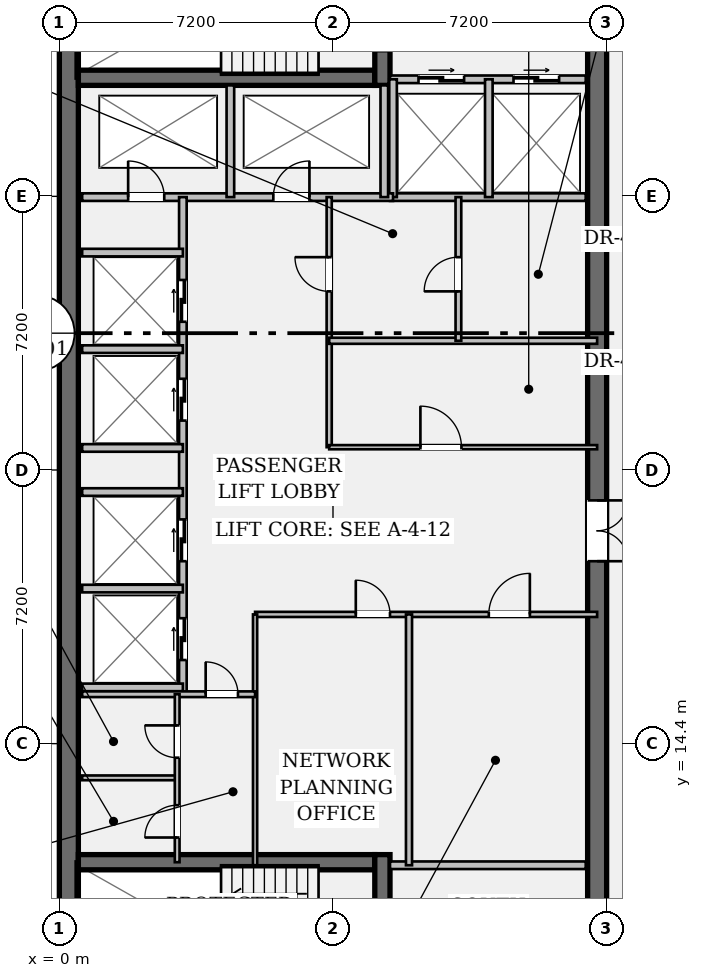
"""IFC4 building model, lengths in metres.
Left out: names, types, materials, properties, quantities, classifications, styles, units other than length and angle.
Written with IfcOpenShell. Run it as: python <this file> out.ifc"""

import sys

from ifc_helpers import new_model, si_unit, direction, frame, frame_2d, origin, place, context, subcontext, project, spatial, rectangle, extrude, element, fill, save


model = new_model("IFC4")
c1 = context("Model", 3, precision=1e-05, world=origin(), true_north=direction((0.0, 1.0)))
c2 = subcontext(c1, "Body", "Model", "MODEL_VIEW")
j1 = project(units=[si_unit("LENGTHUNIT", "METRE"), si_unit("PLANEANGLEUNIT", "RADIAN")], contexts=[c1])
p1 = place(None, origin())
s1 = spatial("IfcSite", under=j1, at=p1, CompositionType="ELEMENT")
p2 = place(p1, origin())
s2 = spatial("IfcBuilding", under=s1, at=p2, CompositionType="ELEMENT")
p3 = place(p2, frame((0.0, 0.0, 208.25)))
s3 = spatial("IfcBuildingStorey", under=s2, at=p3, CompositionType="ELEMENT", Elevation=208.25)
p4 = place(p3, frame((0.25, 7.2, 0.0), z_axis=(0.0, 0.0, 1.0), x_axis=(0.0, 1.0, 0.0)))
e1 = element("IfcWall", 1, at=p4, inside=s3, PredefinedType="SHEAR", context=c2, shape_type="SweptSolid", body=[
    extrude(rectangle(XDim=28.8, YDim=0.5, at=frame_2d((14.4, 0.0))), origin(), (0.0, 0.0, 1.0), 3.24),
])
p5 = place(p3, frame((14.15, 35.5, 0.0), z_axis=(0.0, 0.0, 1.0), x_axis=(0.0, -1.0, 0.0)))
e2 = element("IfcWall", 2, at=p5, inside=s3, PredefinedType="SHEAR", context=c2, shape_type="SweptSolid", body=[
    extrude(rectangle(XDim=27.8, YDim=0.5, at=frame_2d((13.9, 0.0))), origin(), (0.0, 0.0, 1.0), 3.24),
])
p6 = place(p5, frame((1.4, 0.0, 0.0)))
e3 = element("IfcOpeningElement", 3, at=p6, cuts=e2, PredefinedType="OPENING", context=c2, shape_type="SweptSolid", body=[
    extrude(rectangle(XDim=1.2, YDim=2.15, at=frame_2d((0.6, 1.075))), frame((0.0, 0.262, 0.0), z_axis=(0.0, -1.0, 0.0), x_axis=(1.0, 0.0, 0.0)), (0.0, 0.0, 1.0), 0.524),
])
p7 = place(p5, frame((25.35, 0.0, 0.0)))
e4 = element("IfcOpeningElement", 4, at=p7, cuts=e2, PredefinedType="OPENING", context=c2, shape_type="SweptSolid", body=[
    extrude(rectangle(XDim=1.2, YDim=2.15, at=frame_2d((0.6, 1.075))), frame((0.0, 0.262, 0.0), z_axis=(0.0, -1.0, 0.0), x_axis=(1.0, 0.0, 0.0)), (0.0, 0.0, 1.0), 0.524),
])
p8 = place(p5, frame((14.7, 0.0, 0.0)))
e5 = element("IfcOpeningElement", 5, at=p8, cuts=e2, PredefinedType="OPENING", context=c2, shape_type="SweptSolid", body=[
    extrude(rectangle(XDim=1.6, YDim=2.2, at=frame_2d((0.8, 1.1))), frame((0.0, 0.262, 0.0), z_axis=(0.0, -1.0, 0.0), x_axis=(1.0, 0.0, 0.0)), (0.0, 0.0, 1.0), 0.524),
])
for number, where, z_axis, x_axis in (
    (6, (0.5, 31.92, 0.0), (0.0, 0.0, 1.0), (1.0, 0.0, 0.0)),
    (7, (0.5, 11.28, 0.0), (0.0, 0.0, 1.0), (1.0, 0.0, 0.0)),
):
    element("IfcWall", number, at=place(p3, frame(where, z_axis=z_axis, x_axis=x_axis)), inside=s3, PredefinedType="SHEAR", context=c2, shape_type="SweptSolid", body=[
        extrude(rectangle(XDim=7.8, YDim=0.4, at=frame_2d((3.9, 0.0))), origin(), (0.0, 0.0, 1.0), 3.24),
    ])
p9 = place(p3, frame((8.5, 31.72, 0.0), z_axis=(0.0, 0.0, 1.0), x_axis=(0.0, 1.0, 0.0)))
e8 = element("IfcWall", 8, at=p9, inside=s3, PredefinedType="SHEAR", context=c2, shape_type="SweptSolid", body=[
    extrude(rectangle(XDim=3.78, YDim=0.4, at=frame_2d((1.89, 0.0))), origin(), (0.0, 0.0, 1.0), 3.24),
])
p10 = place(p9, frame((0.9, 0.0, 0.0)))
e9 = element("IfcOpeningElement", 9, at=p10, cuts=e8, PredefinedType="OPENING", context=c2, shape_type="SweptSolid", body=[
    extrude(rectangle(XDim=1.1, YDim=2.15, at=frame_2d((0.55, 1.075))), frame((0.0, 0.212, 0.0), z_axis=(0.0, -1.0, 0.0), x_axis=(1.0, 0.0, 0.0)), (0.0, 0.0, 1.0), 0.424),
])
p11 = place(p3, frame((8.5, 7.7, 0.0), z_axis=(0.0, 0.0, 1.0), x_axis=(0.0, 1.0, 0.0)))
e10 = element("IfcWall", 10, at=p11, inside=s3, PredefinedType="SHEAR", context=c2, shape_type="SweptSolid", body=[
    extrude(rectangle(XDim=3.78, YDim=0.4, at=frame_2d((1.89, 0.0))), origin(), (0.0, 0.0, 1.0), 3.24),
])
p12 = place(p11, frame((0.85, 0.0, 0.0)))
e11 = element("IfcOpeningElement", 11, at=p12, cuts=e10, PredefinedType="OPENING", context=c2, shape_type="SweptSolid", body=[
    extrude(rectangle(XDim=1.1, YDim=2.15, at=frame_2d((0.55, 1.075))), frame((0.0, 0.212, 0.0), z_axis=(0.0, -1.0, 0.0), x_axis=(1.0, 0.0, 0.0)), (0.0, 0.0, 1.0), 0.424),
])
p13 = place(p3, frame((8.7, 31.88, 0.0), z_axis=(0.0, 0.0, 1.0), x_axis=(1.0, 0.0, 0.0)))
e12 = element("IfcWall", 12, at=p13, inside=s3, PredefinedType="PARTITIONING", context=c2, shape_type="SweptSolid", body=[
    extrude(rectangle(XDim=5.15, YDim=0.2, at=frame_2d((2.575, 0.0))), origin(), (0.0, 0.0, 1.0), 3.24),
])
p14 = place(p13, frame((0.75, 0.0, 0.0)))
e13 = element("IfcOpeningElement", 13, at=p14, cuts=e12, PredefinedType="OPENING", context=c2, shape_type="SweptSolid", body=[
    extrude(rectangle(XDim=1.2, YDim=2.2, at=frame_2d((0.6, 1.1))), frame((0.0, 0.112, 0.0), z_axis=(0.0, -1.0, 0.0), x_axis=(1.0, 0.0, 0.0)), (0.0, 0.0, 1.0), 0.224),
])
p15 = place(p13, frame((3.25, 0.0, 0.0)))
e14 = element("IfcOpeningElement", 14, at=p15, cuts=e12, PredefinedType="OPENING", context=c2, shape_type="SweptSolid", body=[
    extrude(rectangle(XDim=1.2, YDim=2.2, at=frame_2d((0.6, 1.1))), frame((0.0, 0.112, 0.0), z_axis=(0.0, -1.0, 0.0), x_axis=(1.0, 0.0, 0.0)), (0.0, 0.0, 1.0), 0.224),
])
for number, where, z_axis, x_axis in (
    (15, (8.7, 11.2, 0.0), (0.0, 0.0, 1.0), (1.0, 0.0, 0.0)),
    (16, (8.7, 28.78, 0.0), (0.0, 0.0, 1.0), (1.0, 0.0, 0.0)),
):
    element("IfcWall", number, at=place(p3, frame(where, z_axis=z_axis, x_axis=x_axis)), inside=s3, PredefinedType="PARTITIONING", context=c2, shape_type="SweptSolid", body=[
        extrude(rectangle(XDim=5.15, YDim=0.2, at=frame_2d((2.575, 0.0))), origin(), (0.0, 0.0, 1.0), 3.24),
    ])
for number, where, z_axis, x_axis in (
    (17, (8.78, 28.78, 0.0), (0.0, 0.0, 1.0), (0.0, 1.0, 0.0)),
    (18, (11.3, 28.78, 0.0), (0.0, 0.0, 1.0), (0.0, 1.0, 0.0)),
):
    element("IfcWall", number, at=place(p3, frame(where, z_axis=z_axis, x_axis=x_axis)), inside=s3, PredefinedType="PARTITIONING", context=c2, shape_type="SweptSolid", body=[
        extrude(rectangle(XDim=3.1, YDim=0.2, at=frame_2d((1.55, 0.0))), origin(), (0.0, 0.0, 1.0), 3.24),
    ])
p16 = place(p3, frame((0.6, 28.78, 0.0), z_axis=(0.0, 0.0, 1.0), x_axis=(1.0, 0.0, 0.0)))
e19 = element("IfcWall", 19, at=p16, inside=s3, PredefinedType="PARTITIONING", context=c2, shape_type="SweptSolid", body=[
    extrude(rectangle(XDim=8.18, YDim=0.2, at=frame_2d((4.09, 0.0))), origin(), (0.0, 0.0, 1.0), 3.24),
])
p17 = place(p16, frame((1.21, 0.0, 0.0)))
e20 = element("IfcOpeningElement", 20, at=p17, cuts=e19, PredefinedType="OPENING", context=c2, shape_type="SweptSolid", body=[
    extrude(rectangle(XDim=0.95, YDim=2.15, at=frame_2d((0.475, 1.075))), frame((0.0, 0.112, 0.0), z_axis=(0.0, -1.0, 0.0), x_axis=(1.0, 0.0, 0.0)), (0.0, 0.0, 1.0), 0.224),
])
p18 = place(p16, frame((5.03, 0.0, 0.0)))
e21 = element("IfcOpeningElement", 21, at=p18, cuts=e19, PredefinedType="OPENING", context=c2, shape_type="SweptSolid", body=[
    extrude(rectangle(XDim=0.95, YDim=2.15, at=frame_2d((0.475, 1.075))), frame((0.0, 0.112, 0.0), z_axis=(0.0, -1.0, 0.0), x_axis=(1.0, 0.0, 0.0)), (0.0, 0.0, 1.0), 0.224),
])
for number, where, z_axis, x_axis in (
    (22, (4.5, 28.78, 0.0), (0.0, 0.0, 1.0), (0.0, 1.0, 0.0)),
    (23, (8.55, 28.78, 0.0), (0.0, 0.0, 1.0), (0.0, 1.0, 0.0)),
):
    element("IfcWall", number, at=place(p3, frame(where, z_axis=z_axis, x_axis=x_axis)), inside=s3, PredefinedType="PARTITIONING", context=c2, shape_type="SweptSolid", body=[
        extrude(rectangle(XDim=2.94, YDim=0.2, at=frame_2d((1.47, 0.0))), origin(), (0.0, 0.0, 1.0), 3.24),
    ])
p19 = place(p3, frame((3.25, 15.7, 0.0), z_axis=(0.0, 0.0, 1.0), x_axis=(0.0, 1.0, 0.0)))
e24 = element("IfcWall", 24, at=p19, inside=s3, PredefinedType="PARTITIONING", context=c2, shape_type="SweptSolid", body=[
    extrude(rectangle(XDim=13.08, YDim=0.2, at=frame_2d((6.54, 0.0))), origin(), (0.0, 0.0, 1.0), 3.24),
])
p20 = place(p19, frame((0.9, 0.0, 0.0)))
e25 = element("IfcOpeningElement", 25, at=p20, cuts=e24, PredefinedType="OPENING", context=c2, shape_type="SweptSolid", body=[
    extrude(rectangle(XDim=1.1, YDim=2.2, at=frame_2d((0.55, 1.1))), frame((0.0, 0.112, 0.0), z_axis=(0.0, -1.0, 0.0), x_axis=(1.0, 0.0, 0.0)), (0.0, 0.0, 1.0), 0.224),
])
p21 = place(p19, frame((3.5, 0.0, 0.0)))
e26 = element("IfcOpeningElement", 26, at=p21, cuts=e24, PredefinedType="OPENING", context=c2, shape_type="SweptSolid", body=[
    extrude(rectangle(XDim=1.1, YDim=2.2, at=frame_2d((0.55, 1.1))), frame((0.0, 0.112, 0.0), z_axis=(0.0, -1.0, 0.0), x_axis=(1.0, 0.0, 0.0)), (0.0, 0.0, 1.0), 0.224),
])
p22 = place(p19, frame((7.2, 0.0, 0.0)))
e27 = element("IfcOpeningElement", 27, at=p22, cuts=e24, PredefinedType="OPENING", context=c2, shape_type="SweptSolid", body=[
    extrude(rectangle(XDim=1.1, YDim=2.2, at=frame_2d((0.55, 1.1))), frame((0.0, 0.112, 0.0), z_axis=(0.0, -1.0, 0.0), x_axis=(1.0, 0.0, 0.0)), (0.0, 0.0, 1.0), 0.224),
])
p23 = place(p19, frame((9.8, 0.0, 0.0)))
e28 = element("IfcOpeningElement", 28, at=p23, cuts=e24, PredefinedType="OPENING", context=c2, shape_type="SweptSolid", body=[
    extrude(rectangle(XDim=1.1, YDim=2.2, at=frame_2d((0.55, 1.1))), frame((0.0, 0.112, 0.0), z_axis=(0.0, -1.0, 0.0), x_axis=(1.0, 0.0, 0.0)), (0.0, 0.0, 1.0), 0.224),
])
for number, where, z_axis, x_axis in (
    (29, (0.6, 15.88, 0.0), (0.0, 0.0, 1.0), (1.0, 0.0, 0.0)),
    (30, (0.6, 18.48, 0.0), (0.0, 0.0, 1.0), (1.0, 0.0, 0.0)),
    (31, (0.6, 22.18, 0.0), (0.0, 0.0, 1.0), (1.0, 0.0, 0.0)),
    (32, (0.6, 24.78, 0.0), (0.0, 0.0, 1.0), (1.0, 0.0, 0.0)),
    (33, (0.6, 21.02, 0.0), (0.0, 0.0, 1.0), (1.0, 0.0, 0.0)),
    (34, (0.6, 27.32, 0.0), (0.0, 0.0, 1.0), (1.0, 0.0, 0.0)),
):
    element("IfcWall", number, at=place(p3, frame(where, z_axis=z_axis, x_axis=x_axis)), inside=s3, PredefinedType="PARTITIONING", context=c2, shape_type="SweptSolid", body=[
        extrude(rectangle(XDim=2.65, YDim=0.2, at=frame_2d((1.325, 0.0))), origin(), (0.0, 0.0, 1.0), 3.24),
    ])
p24 = place(p3, frame((7.1, 22.2, 0.0), z_axis=(0.0, 0.0, 1.0), x_axis=(0.0, 1.0, 0.0)))
e35 = element("IfcWall", 35, at=p24, inside=s3, PredefinedType="PARTITIONING", context=c2, shape_type="SweptSolid", body=[
    extrude(rectangle(XDim=6.58, YDim=0.135, at=frame_2d((3.29, 0.0))), origin(), (0.0, 0.0, 1.0), 3.24),
])
p25 = place(p24, frame((4.1, 0.0, 0.0)))
e36 = element("IfcOpeningElement", 36, at=p25, cuts=e35, PredefinedType="OPENING", context=c2, shape_type="SweptSolid", body=[
    extrude(rectangle(XDim=0.9, YDim=2.15, at=frame_2d((0.45, 1.075))), frame((0.0, 0.08, 0.0), z_axis=(0.0, -1.0, 0.0), x_axis=(1.0, 0.0, 0.0)), (0.0, 0.0, 1.0), 0.159),
])
p26 = place(p3, frame((7.1, 22.2, 0.0), z_axis=(0.0, 0.0, 1.0), x_axis=(1.0, 0.0, 0.0)))
e37 = element("IfcWall", 37, at=p26, inside=s3, PredefinedType="PARTITIONING", context=c2, shape_type="SweptSolid", body=[
    extrude(rectangle(XDim=7.05, YDim=0.11, at=frame_2d((3.525, 0.0))), origin(), (0.0, 0.0, 1.0), 3.24),
])
p27 = place(p26, frame((2.4, 0.0, 0.0)))
e38 = element("IfcOpeningElement", 38, at=p27, cuts=e37, PredefinedType="OPENING", context=c2, shape_type="SweptSolid", body=[
    extrude(rectangle(XDim=1.08, YDim=2.15, at=frame_2d((0.54, 1.075))), frame((0.0, 0.067, 0.0), z_axis=(0.0, -1.0, 0.0), x_axis=(1.0, 0.0, 0.0)), (0.0, 0.0, 1.0), 0.134),
])
p28 = place(p3, frame((7.1, 25.0, 0.0), z_axis=(0.0, 0.0, 1.0), x_axis=(1.0, 0.0, 0.0)))
e39 = element("IfcWall", 39, at=p28, inside=s3, PredefinedType="PARTITIONING", context=c2, shape_type="SweptSolid", body=[
    extrude(rectangle(XDim=7.05, YDim=0.16, at=frame_2d((3.525, 0.0))), origin(), (0.0, 0.0, 1.0), 3.24),
])
p29 = place(p3, frame((10.5, 25.0, 0.0), z_axis=(0.0, 0.0, 1.0), x_axis=(0.0, 1.0, 0.0)))
e40 = element("IfcWall", 40, at=p29, inside=s3, PredefinedType="PARTITIONING", context=c2, shape_type="SweptSolid", body=[
    extrude(rectangle(XDim=3.78, YDim=0.15, at=frame_2d((1.89, 0.0))), origin(), (0.0, 0.0, 1.0), 3.24),
])
p30 = place(p29, frame((1.3, 0.0, 0.0)))
e41 = element("IfcOpeningElement", 41, at=p30, cuts=e40, PredefinedType="OPENING", context=c2, shape_type="SweptSolid", body=[
    extrude(rectangle(XDim=0.9, YDim=2.15, at=frame_2d((0.45, 1.075))), frame((0.0, 0.087, 0.0), z_axis=(0.0, -1.0, 0.0), x_axis=(1.0, 0.0, 0.0)), (0.0, 0.0, 1.0), 0.174),
])
p31 = place(p3, frame((5.15, 17.8, 0.0), z_axis=(0.0, 0.0, 1.0), x_axis=(1.0, 0.0, 0.0)))
e42 = element("IfcWall", 42, at=p31, inside=s3, PredefinedType="PARTITIONING", context=c2, shape_type="SweptSolid", body=[
    extrude(rectangle(XDim=9.0, YDim=0.135, at=frame_2d((4.5, 0.0))), origin(), (0.0, 0.0, 1.0), 3.24),
])
p32 = place(p31, frame((2.65, 0.0, 0.0)))
e43 = element("IfcOpeningElement", 43, at=p32, cuts=e42, PredefinedType="OPENING", context=c2, shape_type="SweptSolid", body=[
    extrude(rectangle(XDim=0.9, YDim=2.15, at=frame_2d((0.45, 1.075))), frame((0.0, 0.08, 0.0), z_axis=(0.0, -1.0, 0.0), x_axis=(1.0, 0.0, 0.0)), (0.0, 0.0, 1.0), 0.159),
])
p33 = place(p31, frame((6.15, 0.0, 0.0)))
e44 = element("IfcOpeningElement", 44, at=p33, cuts=e42, PredefinedType="OPENING", context=c2, shape_type="SweptSolid", body=[
    extrude(rectangle(XDim=1.08, YDim=2.15, at=frame_2d((0.54, 1.075))), frame((0.0, 0.08, 0.0), z_axis=(0.0, -1.0, 0.0), x_axis=(1.0, 0.0, 0.0)), (0.0, 0.0, 1.0), 0.159),
])
p34 = place(p3, frame((5.15, 11.2, 0.0), z_axis=(0.0, 0.0, 1.0), x_axis=(0.0, 1.0, 0.0)))
e45 = element("IfcWall", 45, at=p34, inside=s3, PredefinedType="PARTITIONING", context=c2, shape_type="SweptSolid", body=[
    extrude(rectangle(XDim=6.6, YDim=0.11, at=frame_2d((3.3, 0.0))), origin(), (0.0, 0.0, 1.0), 3.24),
])
p35 = place(p3, frame((9.2, 11.2, 0.0), z_axis=(0.0, 0.0, 1.0), x_axis=(0.0, 1.0, 0.0)))
e46 = element("IfcWall", 46, at=p35, inside=s3, PredefinedType="PARTITIONING", context=c2, shape_type="SweptSolid", body=[
    extrude(rectangle(XDim=6.6, YDim=0.16, at=frame_2d((3.3, 0.0))), origin(), (0.0, 0.0, 1.0), 3.24),
])
p36 = place(p3, frame((0.6, 15.7, 0.0), z_axis=(0.0, 0.0, 1.0), x_axis=(1.0, 0.0, 0.0)))
e47 = element("IfcWall", 47, at=p36, inside=s3, PredefinedType="PARTITIONING", context=c2, shape_type="SweptSolid", body=[
    extrude(rectangle(XDim=4.55, YDim=0.15, at=frame_2d((2.275, 0.0))), origin(), (0.0, 0.0, 1.0), 3.24),
])
p37 = place(p36, frame((3.25, 0.0, 0.0)))
e48 = element("IfcOpeningElement", 48, at=p37, cuts=e47, PredefinedType="OPENING", context=c2, shape_type="SweptSolid", body=[
    extrude(rectangle(XDim=0.85, YDim=2.15, at=frame_2d((0.425, 1.075))), frame((0.0, 0.087, 0.0), z_axis=(0.0, -1.0, 0.0), x_axis=(1.0, 0.0, 0.0)), (0.0, 0.0, 1.0), 0.174),
])
p38 = place(p3, frame((0.6, 13.5, 0.0), z_axis=(0.0, 0.0, 1.0), x_axis=(1.0, 0.0, 0.0)))
e49 = element("IfcWall", 49, at=p38, inside=s3, PredefinedType="PARTITIONING", context=c2, shape_type="SweptSolid", body=[
    extrude(rectangle(XDim=2.5, YDim=0.125, at=frame_2d((1.25, 0.0))), origin(), (0.0, 0.0, 1.0), 3.24),
])
p39 = place(p3, frame((3.1, 11.28, 0.0), z_axis=(0.0, 0.0, 1.0), x_axis=(0.0, 1.0, 0.0)))
e50 = element("IfcWall", 50, at=p39, inside=s3, PredefinedType="PARTITIONING", context=c2, shape_type="SweptSolid", body=[
    extrude(rectangle(XDim=4.42, YDim=0.125, at=frame_2d((2.21, 0.0))), origin(), (0.0, 0.0, 1.0), 3.24),
])
p40 = place(p39, frame((0.65, 0.0, 0.0)))
e51 = element("IfcOpeningElement", 51, at=p40, cuts=e50, PredefinedType="OPENING", context=c2, shape_type="SweptSolid", body=[
    extrude(rectangle(XDim=0.85, YDim=2.15, at=frame_2d((0.425, 1.075))), frame((0.0, 0.074, 0.0), z_axis=(0.0, -1.0, 0.0), x_axis=(1.0, 0.0, 0.0)), (0.0, 0.0, 1.0), 0.149),
])
p41 = place(p39, frame((2.75, 0.0, 0.0)))
e52 = element("IfcOpeningElement", 52, at=p41, cuts=e50, PredefinedType="OPENING", context=c2, shape_type="SweptSolid", body=[
    extrude(rectangle(XDim=0.85, YDim=2.15, at=frame_2d((0.425, 1.075))), frame((0.0, 0.074, 0.0), z_axis=(0.0, -1.0, 0.0), x_axis=(1.0, 0.0, 0.0)), (0.0, 0.0, 1.0), 0.149),
])
p42 = place(p14, origin())
e53 = element("IfcDoor", 53, at=p42, inside=s3, OperationType="DOUBLE_DOOR_SLIDING", PredefinedType="DOOR", context=c2, shape_type="SweptSolid", body=[
    extrude(rectangle(XDim=1.2, YDim=2.2, at=frame_2d((0.6, 1.1))), frame((0.0, 0.025, 0.0), z_axis=(0.0, -1.0, 0.0), x_axis=(1.0, 0.0, 0.0)), (0.0, 0.0, 1.0), 0.05),
])
fill(e13, e53)
p43 = place(p15, origin())
e54 = element("IfcDoor", 54, at=p43, inside=s3, OperationType="DOUBLE_DOOR_SLIDING", PredefinedType="DOOR", context=c2, shape_type="SweptSolid", body=[
    extrude(rectangle(XDim=1.2, YDim=2.2, at=frame_2d((0.6, 1.1))), frame((0.0, 0.025, 0.0), z_axis=(0.0, -1.0, 0.0), x_axis=(1.0, 0.0, 0.0)), (0.0, 0.0, 1.0), 0.05),
])
fill(e14, e54)
p44 = place(p17, origin())
e55 = element("IfcDoor", 55, at=p44, inside=s3, OperationType="SINGLE_SWING_LEFT", PredefinedType="DOOR", context=c2, shape_type="SweptSolid", body=[
    extrude(rectangle(XDim=0.95, YDim=2.15, at=frame_2d((0.475, 1.075))), frame((0.0, 0.025, 0.0), z_axis=(0.0, -1.0, 0.0), x_axis=(1.0, 0.0, 0.0)), (0.0, 0.0, 1.0), 0.05),
])
fill(e20, e55)
p45 = place(p18, origin())
e56 = element("IfcDoor", 56, at=p45, inside=s3, OperationType="SINGLE_SWING_RIGHT", PredefinedType="DOOR", context=c2, shape_type="SweptSolid", body=[
    extrude(rectangle(XDim=0.95, YDim=2.15, at=frame_2d((0.475, 1.075))), frame((0.0, 0.025, 0.0), z_axis=(0.0, -1.0, 0.0), x_axis=(1.0, 0.0, 0.0)), (0.0, 0.0, 1.0), 0.05),
])
fill(e21, e56)
p46 = place(p8, origin())
e57 = element("IfcDoor", 57, at=p46, inside=s3, OperationType="DOUBLE_DOOR_SINGLE_SWING", PredefinedType="DOOR", context=c2, shape_type="SweptSolid", body=[
    extrude(rectangle(XDim=1.6, YDim=2.2, at=frame_2d((0.8, 1.1))), frame((0.0, 0.025, 0.0), z_axis=(0.0, -1.0, 0.0), x_axis=(1.0, 0.0, 0.0)), (0.0, 0.0, 1.0), 0.05),
])
fill(e5, e57)
p47 = place(p20, origin())
e58 = element("IfcDoor", 58, at=p47, inside=s3, OperationType="DOUBLE_DOOR_SLIDING", PredefinedType="DOOR", context=c2, shape_type="SweptSolid", body=[
    extrude(rectangle(XDim=1.1, YDim=2.2, at=frame_2d((0.55, 1.1))), frame((0.0, 0.025, 0.0), z_axis=(0.0, -1.0, 0.0), x_axis=(1.0, 0.0, 0.0)), (0.0, 0.0, 1.0), 0.05),
])
fill(e25, e58)
p48 = place(p21, origin())
e59 = element("IfcDoor", 59, at=p48, inside=s3, OperationType="DOUBLE_DOOR_SLIDING", PredefinedType="DOOR", context=c2, shape_type="SweptSolid", body=[
    extrude(rectangle(XDim=1.1, YDim=2.2, at=frame_2d((0.55, 1.1))), frame((0.0, 0.025, 0.0), z_axis=(0.0, -1.0, 0.0), x_axis=(1.0, 0.0, 0.0)), (0.0, 0.0, 1.0), 0.05),
])
fill(e26, e59)
p49 = place(p22, origin())
e60 = element("IfcDoor", 60, at=p49, inside=s3, OperationType="DOUBLE_DOOR_SLIDING", PredefinedType="DOOR", context=c2, shape_type="SweptSolid", body=[
    extrude(rectangle(XDim=1.1, YDim=2.2, at=frame_2d((0.55, 1.1))), frame((0.0, 0.025, 0.0), z_axis=(0.0, -1.0, 0.0), x_axis=(1.0, 0.0, 0.0)), (0.0, 0.0, 1.0), 0.05),
])
fill(e27, e60)
p50 = place(p23, origin())
e61 = element("IfcDoor", 61, at=p50, inside=s3, OperationType="DOUBLE_DOOR_SLIDING", PredefinedType="DOOR", context=c2, shape_type="SweptSolid", body=[
    extrude(rectangle(XDim=1.1, YDim=2.2, at=frame_2d((0.55, 1.1))), frame((0.0, 0.025, 0.0), z_axis=(0.0, -1.0, 0.0), x_axis=(1.0, 0.0, 0.0)), (0.0, 0.0, 1.0), 0.05),
])
fill(e28, e61)
p51 = place(p27, origin())
e62 = element("IfcDoor", 62, at=p51, inside=s3, OperationType="SINGLE_SWING_LEFT", PredefinedType="DOOR", context=c2, shape_type="SweptSolid", body=[
    extrude(rectangle(XDim=1.08, YDim=2.15, at=frame_2d((0.54, 1.075))), frame((0.0, 0.025, 0.0), z_axis=(0.0, -1.0, 0.0), x_axis=(1.0, 0.0, 0.0)), (0.0, 0.0, 1.0), 0.05),
])
fill(e38, e62)
p52 = place(p25, origin())
e63 = element("IfcDoor", 63, at=p52, inside=s3, OperationType="SINGLE_SWING_RIGHT", PredefinedType="DOOR", context=c2, shape_type="SweptSolid", body=[
    extrude(rectangle(XDim=0.9, YDim=2.15, at=frame_2d((0.45, 1.075))), frame((0.0, 0.025, 0.0), z_axis=(0.0, -1.0, 0.0), x_axis=(1.0, 0.0, 0.0)), (0.0, 0.0, 1.0), 0.05),
])
fill(e36, e63)
p53 = place(p30, origin())
e64 = element("IfcDoor", 64, at=p53, inside=s3, OperationType="SINGLE_SWING_LEFT", PredefinedType="DOOR", context=c2, shape_type="SweptSolid", body=[
    extrude(rectangle(XDim=0.9, YDim=2.15, at=frame_2d((0.45, 1.075))), frame((0.0, 0.025, 0.0), z_axis=(0.0, -1.0, 0.0), x_axis=(1.0, 0.0, 0.0)), (0.0, 0.0, 1.0), 0.05),
])
fill(e41, e64)
p54 = place(p32, origin())
e65 = element("IfcDoor", 65, at=p54, inside=s3, OperationType="SINGLE_SWING_LEFT", PredefinedType="DOOR", context=c2, shape_type="SweptSolid", body=[
    extrude(rectangle(XDim=0.9, YDim=2.15, at=frame_2d((0.45, 1.075))), frame((0.0, 0.025, 0.0), z_axis=(0.0, -1.0, 0.0), x_axis=(1.0, 0.0, 0.0)), (0.0, 0.0, 1.0), 0.05),
])
fill(e43, e65)
p55 = place(p33, origin())
e66 = element("IfcDoor", 66, at=p55, inside=s3, OperationType="SINGLE_SWING_RIGHT", PredefinedType="DOOR", context=c2, shape_type="SweptSolid", body=[
    extrude(rectangle(XDim=1.08, YDim=2.15, at=frame_2d((0.54, 1.075))), frame((0.0, 0.025, 0.0), z_axis=(0.0, -1.0, 0.0), x_axis=(1.0, 0.0, 0.0)), (0.0, 0.0, 1.0), 0.05),
])
fill(e44, e66)
p56 = place(p37, origin())
e67 = element("IfcDoor", 67, at=p56, inside=s3, OperationType="SINGLE_SWING_LEFT", PredefinedType="DOOR", context=c2, shape_type="SweptSolid", body=[
    extrude(rectangle(XDim=0.85, YDim=2.15, at=frame_2d((0.425, 1.075))), frame((0.0, 0.025, 0.0), z_axis=(0.0, -1.0, 0.0), x_axis=(1.0, 0.0, 0.0)), (0.0, 0.0, 1.0), 0.05),
])
fill(e48, e67)
p57 = place(p40, origin())
e68 = element("IfcDoor", 68, at=p57, inside=s3, OperationType="SINGLE_SWING_LEFT", PredefinedType="DOOR", context=c2, shape_type="SweptSolid", body=[
    extrude(rectangle(XDim=0.85, YDim=2.15, at=frame_2d((0.425, 1.075))), frame((0.0, 0.025, 0.0), z_axis=(0.0, -1.0, 0.0), x_axis=(1.0, 0.0, 0.0)), (0.0, 0.0, 1.0), 0.05),
])
fill(e51, e68)
p58 = place(p41, origin())
e69 = element("IfcDoor", 69, at=p58, inside=s3, OperationType="SINGLE_SWING_RIGHT", PredefinedType="DOOR", context=c2, shape_type="SweptSolid", body=[
    extrude(rectangle(XDim=0.85, YDim=2.15, at=frame_2d((0.425, 1.075))), frame((0.0, 0.025, 0.0), z_axis=(0.0, -1.0, 0.0), x_axis=(1.0, 0.0, 0.0)), (0.0, 0.0, 1.0), 0.05),
])
fill(e52, e69)
save(model, sys.argv[1])
